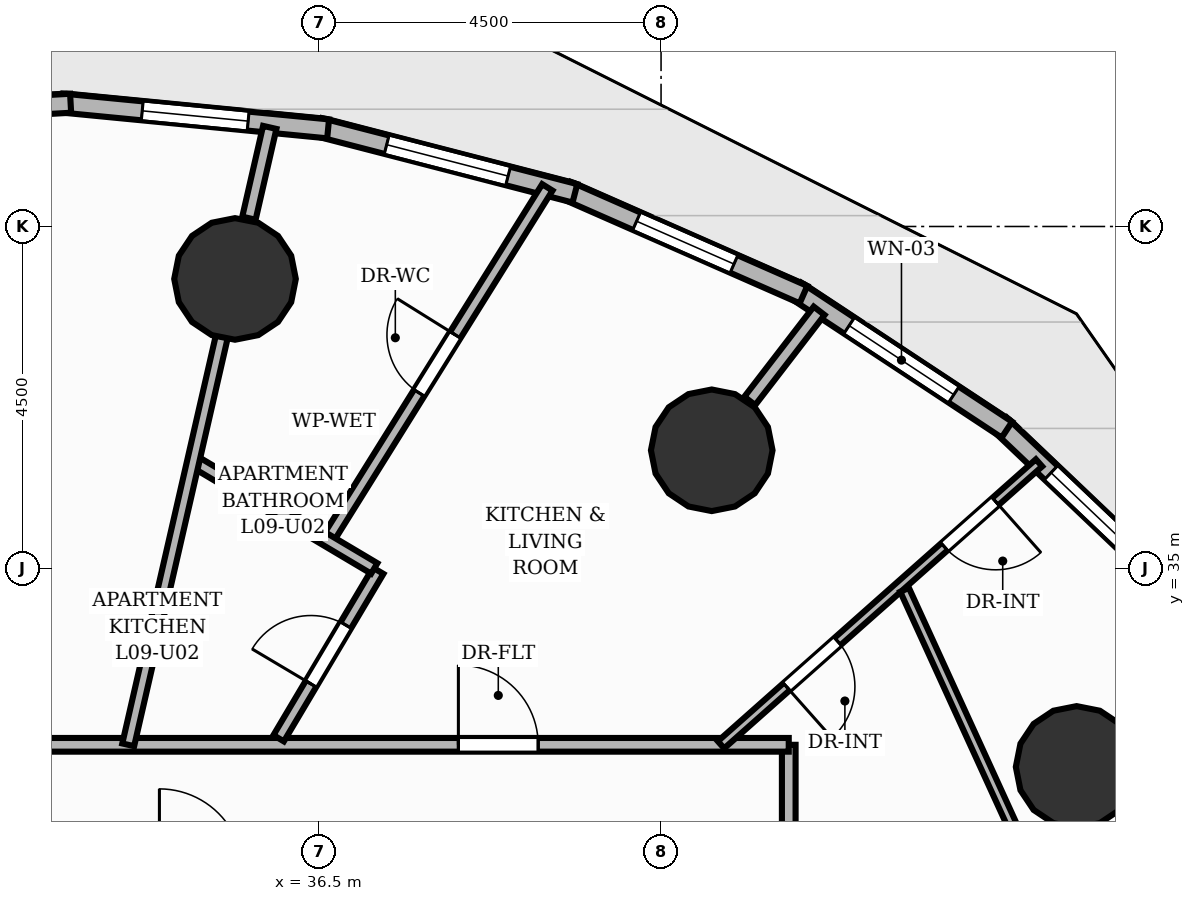
"""IFC4 building model, lengths in metres.
Left out: names, types, materials, properties, quantities, classifications, styles, units other than length and angle.
Written with IfcOpenShell. Run it as: python <this file> out.ifc"""

import sys

from ifc_helpers import new_model, si_unit, direction, frame, frame_2d, origin, origin_2d, place, context, subcontext, project, spatial, rectangle, circle, extrude, element, fill, save


model = new_model("IFC4")
c1 = context("Model", 3, precision=1e-05, world=origin(), true_north=direction((0.0, 1.0)))
c2 = subcontext(c1, "Body", "Model", "MODEL_VIEW")
j1 = project(units=[si_unit("LENGTHUNIT", "METRE"), si_unit("PLANEANGLEUNIT", "RADIAN")], contexts=[c1])
p1 = place(None, origin())
s1 = spatial("IfcSite", under=j1, at=p1, CompositionType="ELEMENT")
p2 = place(p1, origin())
s2 = spatial("IfcBuilding", under=s1, at=p2, CompositionType="ELEMENT")
p3 = place(p2, frame((0.0, 0.0, 34.4)))
s3 = spatial("IfcBuildingStorey", under=s2, at=p3, CompositionType="ELEMENT", Elevation=34.4)
for number, where, z_axis, x_axis in (
    (1, (46.468, 32.389, 0.0), (0.0, 0.0, 1.0), (1.0, 0.0, 0.0)),
    (2, (41.667, 36.555, 0.0), (0.0, 0.0, 1.0), (1.0, 0.0, 0.0)),
    (3, (35.395, 38.81, 0.0), (0.0, 0.0, 1.0), (1.0, 0.0, 0.0)),
):
    element("IfcColumn", number, at=place(p3, frame(where, z_axis=z_axis, x_axis=x_axis)), inside=s3, PredefinedType="COLUMN", context=c2, shape_type="SweptSolid", body=[
        extrude(circle(Radius=0.8, at=origin_2d()), origin(), (0.0, 0.0, 1.0), 3.2),
    ])
p4 = place(p3, frame((45.462, 36.896, 0.0), z_axis=(0.0, 0.0, 1.0), x_axis=(0.724569059836, -0.689202203659, 0.0)))
e4 = element("IfcWall", 4, at=p4, inside=s3, PredefinedType="SOLIDWALL", context=c2, shape_type="SweptSolid", body=[
    extrude(rectangle(XDim=3.244, YDim=0.25, at=frame_2d((1.622, 0.0))), origin(), (0.0, 0.0, 1.0), 2.96),
])
p5 = place(p4, frame((0.922, 0.0, 0.85)))
e5 = element("IfcOpeningElement", 5, at=p5, cuts=e4, PredefinedType="OPENING", context=c2, shape_type="SweptSolid", body=[
    extrude(rectangle(XDim=1.4, YDim=1.55, at=frame_2d((0.7, 0.775))), frame((0.0, 0.135, 0.0), z_axis=(0.0, -1.0, 0.0), x_axis=(1.0, 0.0, 0.0)), (0.0, 0.0, 1.0), 0.27),
])
p6 = place(p3, frame((42.777, 38.656, 0.0), z_axis=(0.0, 0.0, 1.0), x_axis=(0.834663448541, -0.550760317805, 0.0)))
e6 = element("IfcWall", 6, at=p6, inside=s3, PredefinedType="SOLIDWALL", context=c2, shape_type="SweptSolid", body=[
    extrude(rectangle(XDim=3.323, YDim=0.25, at=frame_2d((1.661, 0.0))), origin(), (0.0, 0.0, 1.0), 2.96),
])
p7 = place(p6, frame((0.836, 0.0, 0.85)))
e7 = element("IfcOpeningElement", 7, at=p7, cuts=e6, PredefinedType="OPENING", context=c2, shape_type="SweptSolid", body=[
    extrude(rectangle(XDim=1.65, YDim=1.55, at=frame_2d((0.825, 0.775))), frame((0.0, 0.135, 0.0), z_axis=(0.0, -1.0, 0.0), x_axis=(1.0, 0.0, 0.0)), (0.0, 0.0, 1.0), 0.27),
])
p8 = place(p3, frame((39.763, 39.972, 0.0), z_axis=(0.0, 0.0, 1.0), x_axis=(0.915312914138, -0.402743428515, 0.0)))
e8 = element("IfcWall", 8, at=p8, inside=s3, PredefinedType="SOLIDWALL", context=c2, shape_type="SweptSolid", body=[
    extrude(rectangle(XDim=3.399, YDim=0.25, at=frame_2d((1.699, 0.0))), origin(), (0.0, 0.0, 1.0), 2.96),
])
p9 = place(p8, frame((1.0, 0.0, 0.85)))
e9 = element("IfcOpeningElement", 9, at=p9, cuts=e8, PredefinedType="OPENING", context=c2, shape_type="SweptSolid", body=[
    extrude(rectangle(XDim=1.4, YDim=1.55, at=frame_2d((0.7, 0.775))), frame((0.0, 0.135, 0.0), z_axis=(0.0, -1.0, 0.0), x_axis=(1.0, 0.0, 0.0)), (0.0, 0.0, 1.0), 0.27),
])
p10 = place(p3, frame((36.512, 40.803, 0.0), z_axis=(0.0, 0.0, 1.0), x_axis=(0.968176058434, -0.250270093848, 0.0)))
e10 = element("IfcWall", 10, at=p10, inside=s3, PredefinedType="SOLIDWALL", context=c2, shape_type="SweptSolid", body=[
    extrude(rectangle(XDim=3.465, YDim=0.25, at=frame_2d((1.732, 0.0))), origin(), (0.0, 0.0, 1.0), 2.96),
])
p11 = place(p10, frame((0.907, 0.0, 0.85)))
e11 = element("IfcOpeningElement", 11, at=p11, cuts=e10, PredefinedType="OPENING", context=c2, shape_type="SweptSolid", body=[
    extrude(rectangle(XDim=1.65, YDim=1.55, at=frame_2d((0.825, 0.775))), frame((0.0, 0.135, 0.0), z_axis=(0.0, -1.0, 0.0), x_axis=(1.0, 0.0, 0.0)), (0.0, 0.0, 1.0), 0.27),
])
p12 = place(p3, frame((33.123, 41.124, 0.0), z_axis=(0.0, 0.0, 1.0), x_axis=(0.995323323337, -0.096599596386, 0.0)))
e12 = element("IfcWall", 12, at=p12, inside=s3, PredefinedType="SOLIDWALL", context=c2, shape_type="SweptSolid", body=[
    extrude(rectangle(XDim=3.513, YDim=0.25, at=frame_2d((1.756, 0.0))), origin(), (0.0, 0.0, 1.0), 2.96),
])
p13 = place(p12, frame((1.056, 0.0, 0.85)))
e13 = element("IfcOpeningElement", 13, at=p13, cuts=e12, PredefinedType="OPENING", context=c2, shape_type="SweptSolid", body=[
    extrude(rectangle(XDim=1.4, YDim=1.29, at=frame_2d((0.7, 0.645))), frame((0.0, 0.135, 0.0), z_axis=(0.0, -1.0, 0.0), x_axis=(1.0, 0.0, 0.0)), (0.0, 0.0, 1.0), 0.27),
])
p14 = place(p3, frame((29.699, 40.923, 0.0), z_axis=(0.0, 0.0, 1.0), x_axis=(0.998425121055, 0.056100602904, 0.0)))
e14 = element("IfcWall", 14, at=p14, inside=s3, PredefinedType="SOLIDWALL", context=c2, shape_type="SweptSolid", body=[
    extrude(rectangle(XDim=3.538, YDim=0.25, at=frame_2d((1.769, 0.0))), origin(), (0.0, 0.0, 1.0), 2.96),
])
p15 = place(p14, frame((1.194, 0.0, 0.0)))
e15 = element("IfcOpeningElement", 15, at=p15, cuts=e14, PredefinedType="OPENING", context=c2, shape_type="SweptSolid", body=[
    extrude(rectangle(XDim=1.15, YDim=2.2, at=frame_2d((0.575, 1.1))), frame((0.0, 0.135, 0.0), z_axis=(0.0, -1.0, 0.0), x_axis=(1.0, 0.0, 0.0)), (0.0, 0.0, 1.0), 0.27),
])
p16 = place(p3, frame((42.167, 37.205, 0.0), z_axis=(0.0, 0.0, 1.0), x_axis=(0.609978856004, 0.792417689876, 0.0)))
e16 = element("IfcWall", 16, at=p16, inside=s3, PredefinedType="PARTITIONING", context=c2, shape_type="SweptSolid", body=[
    extrude(rectangle(XDim=1.496, YDim=0.18, at=frame_2d((0.748, 0.0))), origin(), (0.0, 0.0, 1.0), 2.178),
])
p17 = place(p3, frame((35.578, 39.609, 0.0), z_axis=(0.0, 0.0, 1.0), x_axis=(0.223317008343, 0.974745871386, 0.0)))
e17 = element("IfcWall", 17, at=p17, inside=s3, PredefinedType="PARTITIONING", context=c2, shape_type="SweptSolid", body=[
    extrude(rectangle(XDim=1.226, YDim=0.18, at=frame_2d((0.613, 0.0))), origin(), (0.0, 0.0, 1.0), 2.178),
])
p18 = place(p3, frame((42.68, 32.68, 0.0), z_axis=(0.0, 0.0, 1.0), x_axis=(0.0, -1.0, 0.0)))
e18 = element("IfcWall", 18, at=p18, inside=s3, PredefinedType="PARTITIONING", context=c2, shape_type="SweptSolid", body=[
    extrude(rectangle(XDim=10.065, YDim=0.18, at=frame_2d((5.032, 0.0))), origin(), (0.0, 0.0, 1.0), 2.955),
])
p19 = place(p18, frame((7.374, 0.0, 0.0)))
e19 = element("IfcOpeningElement", 19, at=p19, cuts=e18, PredefinedType="OPENING", context=c2, shape_type="SweptSolid", body=[
    extrude(rectangle(XDim=0.9, YDim=2.1, at=frame_2d((0.45, 1.05))), frame((0.0, 0.1, 0.0), z_axis=(0.0, -1.0, 0.0), x_axis=(1.0, 0.0, 0.0)), (0.0, 0.0, 1.0), 0.2),
])
p20 = place(p3, frame((21.32, 32.68, 0.0), z_axis=(0.0, 0.0, 1.0), x_axis=(1.0, 0.0, 0.0)))
e20 = element("IfcWall", 20, at=p20, inside=s3, PredefinedType="PARTITIONING", context=c2, shape_type="SweptSolid", body=[
    extrude(rectangle(XDim=21.36, YDim=0.18, at=frame_2d((10.68, 0.0))), origin(), (0.0, 0.0, 1.0), 2.955),
])
p21 = place(p20, frame((17.013, 0.0, 0.0)))
e21 = element("IfcOpeningElement", 21, at=p21, cuts=e20, PredefinedType="OPENING", context=c2, shape_type="SweptSolid", body=[
    extrude(rectangle(XDim=1.05, YDim=2.15, at=frame_2d((0.525, 1.075))), frame((0.0, 0.1, 0.0), z_axis=(0.0, -1.0, 0.0), x_axis=(1.0, 0.0, 0.0)), (0.0, 0.0, 1.0), 0.2),
])
p22 = place(p20, frame((5.82, 0.0, 0.0)))
e22 = element("IfcOpeningElement", 22, at=p22, cuts=e20, PredefinedType="OPENING", context=c2, shape_type="SweptSolid", body=[
    extrude(rectangle(XDim=1.05, YDim=2.15, at=frame_2d((0.525, 1.075))), frame((0.0, 0.1, 0.0), z_axis=(0.0, -1.0, 0.0), x_axis=(1.0, 0.0, 0.0)), (0.0, 0.0, 1.0), 0.2),
])
p23 = place(p3, frame((36.607, 35.369, 0.0), z_axis=(0.0, 0.0, 1.0), x_axis=(0.529180994646, 0.848508971612, 0.0)))
e23 = element("IfcWall", 23, at=p23, inside=s3, PredefinedType="PLUMBINGWALL", context=c2, shape_type="SweptSolid", body=[
    extrude(rectangle(XDim=5.475, YDim=0.16, at=frame_2d((2.737, 0.0))), origin(), (0.0, 0.0, 1.0), 2.642),
])
p24 = place(p23, frame((2.288, 0.0, 0.0)))
e24 = element("IfcOpeningElement", 24, at=p24, cuts=e23, PredefinedType="OPENING", context=c2, shape_type="SweptSolid", body=[
    extrude(rectangle(XDim=0.9, YDim=2.1, at=frame_2d((0.45, 1.05))), frame((0.0, 0.09, 0.0), z_axis=(0.0, -1.0, 0.0), x_axis=(1.0, 0.0, 0.0)), (0.0, 0.0, 1.0), 0.18),
])
p25 = place(p3, frame((45.973, 36.39, 0.0), z_axis=(0.0, 0.0, 1.0), x_axis=(-0.748208515509, -0.663463651845, 0.0)))
e25 = element("IfcWall", 25, at=p25, inside=s3, PredefinedType="PARTITIONING", context=c2, shape_type="SweptSolid", body=[
    extrude(rectangle(XDim=5.592, YDim=0.125, at=frame_2d((2.796, 0.0))), origin(), (0.0, 0.0, 1.0), 2.955),
])
p26 = place(p25, frame((0.765, 0.0, 0.0)))
e26 = element("IfcOpeningElement", 26, at=p26, cuts=e25, PredefinedType="OPENING", context=c2, shape_type="SweptSolid", body=[
    extrude(rectangle(XDim=0.9, YDim=2.1, at=frame_2d((0.45, 1.05))), frame((0.0, 0.073, 0.0), z_axis=(0.0, -1.0, 0.0), x_axis=(1.0, 0.0, 0.0)), (0.0, 0.0, 1.0), 0.145),
])
p27 = place(p25, frame((3.54, 0.0, 0.0)))
e27 = element("IfcOpeningElement", 27, at=p27, cuts=e25, PredefinedType="OPENING", context=c2, shape_type="SweptSolid", body=[
    extrude(rectangle(XDim=0.9, YDim=2.1, at=frame_2d((0.45, 1.05))), frame((0.0, 0.073, 0.0), z_axis=(0.0, -1.0, 0.0), x_axis=(1.0, 0.0, 0.0)), (0.0, 0.0, 1.0), 0.145),
])
p28 = place(p3, frame((35.969, 32.766, 0.0), z_axis=(0.0, 0.0, 1.0), x_axis=(0.51079395194, 0.859703168926, 0.0)))
e28 = element("IfcWall", 28, at=p28, inside=s3, PredefinedType="PLUMBINGWALL", context=c2, shape_type="SweptSolid", body=[
    extrude(rectangle(XDim=2.564, YDim=0.16, at=frame_2d((1.282, 0.0))), origin(), (0.0, 0.0, 1.0), 2.955),
])
p29 = place(p28, frame((0.832, 0.0, 0.0)))
e29 = element("IfcOpeningElement", 29, at=p29, cuts=e28, PredefinedType="OPENING", context=c2, shape_type="SweptSolid", body=[
    extrude(rectangle(XDim=0.9, YDim=2.1, at=frame_2d((0.45, 1.05))), frame((0.0, 0.09, 0.0), z_axis=(0.0, -1.0, 0.0), x_axis=(1.0, 0.0, 0.0)), (0.0, 0.0, 1.0), 0.18),
])
p30 = place(p3, frame((37.227, 35.001, 0.0), z_axis=(0.0, 0.0, 1.0), x_axis=(-0.859670870998, 0.510848307776, 0.0)))
e30 = element("IfcWall", 30, at=p30, inside=s3, PredefinedType="PLUMBINGWALL", context=c2, shape_type="SweptSolid", body=[
    extrude(rectangle(XDim=2.77, YDim=0.16, at=frame_2d((1.385, 0.0))), origin(), (0.0, 0.0, 1.0), 2.955),
])
p31 = place(p3, frame((33.99, 32.68, 0.0), z_axis=(0.0, 0.0, 1.0), x_axis=(0.223435779217, 0.974718653031, 0.0)))
e31 = element("IfcWall", 31, at=p31, inside=s3, PredefinedType="PLUMBINGWALL", context=c2, shape_type="SweptSolid", body=[
    extrude(rectangle(XDim=5.511, YDim=0.16, at=frame_2d((2.756, 0.0))), origin(), (0.0, 0.0, 1.0), 2.178),
])
p32 = place(p3, frame((47.81, 26.827, 0.0), z_axis=(0.0, 0.0, 1.0), x_axis=(-0.41559351113, 0.909550456823, 0.0)))
e32 = element("IfcWall", 32, at=p32, inside=s3, PredefinedType="PARTITIONING", context=c2, shape_type="SweptSolid", body=[
    extrude(rectangle(XDim=8.677, YDim=0.125, at=frame_2d((4.338, 0.0))), origin(), (0.0, 0.0, 1.0), 2.328),
])
p33 = place(p5, origin())
e33 = element("IfcWindow", 33, at=p33, inside=s3, PartitioningType="SINGLE_PANEL", PredefinedType="WINDOW", context=c2, shape_type="SweptSolid", body=[
    extrude(rectangle(XDim=1.4, YDim=1.55, at=frame_2d((0.7, 0.775))), frame((0.0, 0.03, 0.0), z_axis=(0.0, -1.0, 0.0), x_axis=(1.0, 0.0, 0.0)), (0.0, 0.0, 1.0), 0.06),
])
fill(e5, e33)
p34 = place(p7, origin())
e34 = element("IfcWindow", 34, at=p34, inside=s3, PartitioningType="SINGLE_PANEL", PredefinedType="WINDOW", context=c2, shape_type="SweptSolid", body=[
    extrude(rectangle(XDim=1.65, YDim=1.55, at=frame_2d((0.825, 0.775))), frame((0.0, 0.03, 0.0), z_axis=(0.0, -1.0, 0.0), x_axis=(1.0, 0.0, 0.0)), (0.0, 0.0, 1.0), 0.06),
])
fill(e7, e34)
p35 = place(p9, origin())
e35 = element("IfcWindow", 35, at=p35, inside=s3, PartitioningType="SINGLE_PANEL", PredefinedType="WINDOW", context=c2, shape_type="SweptSolid", body=[
    extrude(rectangle(XDim=1.4, YDim=1.55, at=frame_2d((0.7, 0.775))), frame((0.0, 0.03, 0.0), z_axis=(0.0, -1.0, 0.0), x_axis=(1.0, 0.0, 0.0)), (0.0, 0.0, 1.0), 0.06),
])
fill(e9, e35)
p36 = place(p11, origin())
e36 = element("IfcWindow", 36, at=p36, inside=s3, PartitioningType="SINGLE_PANEL", PredefinedType="WINDOW", context=c2, shape_type="SweptSolid", body=[
    extrude(rectangle(XDim=1.65, YDim=1.55, at=frame_2d((0.825, 0.775))), frame((0.0, 0.03, 0.0), z_axis=(0.0, -1.0, 0.0), x_axis=(1.0, 0.0, 0.0)), (0.0, 0.0, 1.0), 0.06),
])
fill(e11, e36)
p37 = place(p13, origin())
e37 = element("IfcWindow", 37, at=p37, inside=s3, PartitioningType="SINGLE_PANEL", PredefinedType="WINDOW", context=c2, shape_type="SweptSolid", body=[
    extrude(rectangle(XDim=1.4, YDim=1.29, at=frame_2d((0.7, 0.645))), frame((0.0, 0.03, 0.0), z_axis=(0.0, -1.0, 0.0), x_axis=(1.0, 0.0, 0.0)), (0.0, 0.0, 1.0), 0.06),
])
fill(e13, e37)
p38 = place(p21, origin())
e38 = element("IfcDoor", 38, at=p38, inside=s3, OperationType="SINGLE_SWING_LEFT", PredefinedType="DOOR", context=c2, shape_type="SweptSolid", body=[
    extrude(rectangle(XDim=1.05, YDim=2.15, at=frame_2d((0.525, 1.075))), frame((0.0, 0.025, 0.0), z_axis=(0.0, -1.0, 0.0), x_axis=(1.0, 0.0, 0.0)), (0.0, 0.0, 1.0), 0.05),
])
fill(e21, e38)
p39 = place(p24, origin())
e39 = element("IfcDoor", 39, at=p39, inside=s3, OperationType="SINGLE_SWING_RIGHT", PredefinedType="DOOR", context=c2, shape_type="SweptSolid", body=[
    extrude(rectangle(XDim=0.9, YDim=2.1, at=frame_2d((0.45, 1.05))), frame((0.0, 0.025, 0.0), z_axis=(0.0, -1.0, 0.0), x_axis=(1.0, 0.0, 0.0)), (0.0, 0.0, 1.0), 0.05),
])
fill(e24, e39)
p40 = place(p26, origin())
e40 = element("IfcDoor", 40, at=p40, inside=s3, OperationType="SINGLE_SWING_LEFT", PredefinedType="DOOR", context=c2, shape_type="SweptSolid", body=[
    extrude(rectangle(XDim=0.9, YDim=2.1, at=frame_2d((0.45, 1.05))), frame((0.0, 0.025, 0.0), z_axis=(0.0, -1.0, 0.0), x_axis=(1.0, 0.0, 0.0)), (0.0, 0.0, 1.0), 0.05),
])
fill(e26, e40)
p41 = place(p27, origin())
e41 = element("IfcDoor", 41, at=p41, inside=s3, OperationType="SINGLE_SWING_RIGHT", PredefinedType="DOOR", context=c2, shape_type="SweptSolid", body=[
    extrude(rectangle(XDim=0.9, YDim=2.1, at=frame_2d((0.45, 1.05))), frame((0.0, 0.025, 0.0), z_axis=(0.0, -1.0, 0.0), x_axis=(1.0, 0.0, 0.0)), (0.0, 0.0, 1.0), 0.05),
])
fill(e27, e41)
p42 = place(p29, origin())
e42 = element("IfcDoor", 42, at=p42, inside=s3, OperationType="SINGLE_SWING_LEFT", PredefinedType="DOOR", context=c2, shape_type="SweptSolid", body=[
    extrude(rectangle(XDim=0.9, YDim=2.1, at=frame_2d((0.45, 1.05))), frame((0.0, 0.025, 0.0), z_axis=(0.0, -1.0, 0.0), x_axis=(1.0, 0.0, 0.0)), (0.0, 0.0, 1.0), 0.05),
])
fill(e29, e42)
save(model, sys.argv[1])
